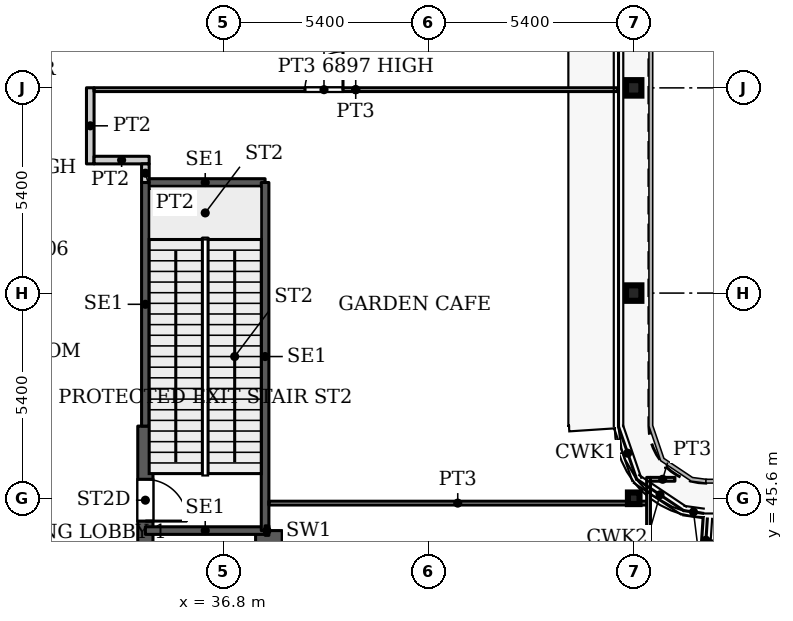
"""IFC4 building model, lengths in metres.
Left out: names, types, materials, properties, quantities, classifications, styles, units other than length and angle.
Written with IfcOpenShell. Run it as: python <this file> out.ifc"""

import sys

from ifc_helpers import new_model, si_unit, direction, frame, frame_2d, origin, origin_2d, place, context, subcontext, project, spatial, rectangle, hollow_rectangle, i_section, extrude, source, transform, mapped, element, fill, save


model = new_model("IFC4")
c1 = context("Model", 3, precision=1e-05, world=origin(), true_north=direction((0.0, 1.0)))
c2 = subcontext(c1, "Body", "Model", "MODEL_VIEW")
j1 = project(units=[si_unit("LENGTHUNIT", "METRE"), si_unit("PLANEANGLEUNIT", "RADIAN")], contexts=[c1])
p1 = place(None, origin())
s1 = spatial("IfcSite", under=j1, at=p1, CompositionType="ELEMENT")
p2 = place(p1, origin())
s2 = spatial("IfcBuilding", under=s1, at=p2, CompositionType="ELEMENT")
p3 = place(p2, frame((0.0, 0.0, 203.3)))
s3 = spatial("IfcBuildingStorey", under=s2, at=p3, CompositionType="ELEMENT", Elevation=203.3)
for number, where, z_axis, x_axis in (
    (1, (47.6, 51.0, 0.0), (0.0, 0.0, 1.0), (1.0, 0.0, 0.0)),
    (2, (47.6, 56.4, 0.0), (0.0, 0.0, 1.0), (1.0, 0.0, 0.0)),
):
    element("IfcColumn", number, at=place(p3, frame(where, z_axis=z_axis, x_axis=x_axis)), inside=s3, PredefinedType="COLUMN", context=c2, shape_type="SweptSolid", body=[
        extrude(i_section(OverallWidth=0.404, OverallDepth=0.407, WebThickness=0.027, FlangeThickness=0.044, FilletRadius=0.012, at=origin_2d()), origin(), (0.0, 0.0, 1.0), 7.8),
    ])
p4 = place(p3, frame((47.6, 45.6, 0.0), z_axis=(0.0, 0.0, 1.0), x_axis=(1.0, 0.0, 0.0)))
e3 = element("IfcColumn", 3, at=p4, inside=s3, PredefinedType="COLUMN", context=c2, shape_type="SweptSolid", body=[
    extrude(hollow_rectangle(XDim=0.305, YDim=0.305, WallThickness=0.016, InnerFilletRadius=0.016, OuterFilletRadius=0.032, at=origin_2d()), origin(), (0.0, 0.0, 1.0), 7.8),
])
p5 = place(p3, frame((34.75, 29.05, 0.0), z_axis=(0.0, 0.0, 1.0), x_axis=(0.0, 1.0, 0.0)))
e4 = element("IfcWall", 4, at=p5, inside=s3, PredefinedType="SHEAR", context=c2, shape_type="SweptSolid", body=[
    extrude(rectangle(XDim=18.45, YDim=0.4, at=frame_2d((9.225, 0.0))), origin(), (0.0, 0.0, 1.0), 7.8),
])
p6 = place(p5, frame((8.025, 0.0, 0.0)))
e5 = element("IfcOpeningElement", 5, at=p6, cuts=e4, PredefinedType="OPENING", context=c2, shape_type="SweptSolid", body=[
    extrude(rectangle(XDim=1.1, YDim=2.2, at=frame_2d((0.55, 1.1))), frame((0.0, 0.21, 0.0), z_axis=(0.0, -1.0, 0.0), x_axis=(1.0, 0.0, 0.0)), (0.0, 0.0, 1.0), 0.42),
])
p7 = place(p5, frame((10.875, 0.0, 0.0)))
e6 = element("IfcOpeningElement", 6, at=p7, cuts=e4, PredefinedType="OPENING", context=c2, shape_type="SweptSolid", body=[
    extrude(rectangle(XDim=1.1, YDim=2.2, at=frame_2d((0.55, 1.1))), frame((0.0, 0.21, 0.0), z_axis=(0.0, -1.0, 0.0), x_axis=(1.0, 0.0, 0.0)), (0.0, 0.0, 1.0), 0.42),
])
p8 = place(p5, frame((13.725, 0.0, 0.0)))
e7 = element("IfcOpeningElement", 7, at=p8, cuts=e4, PredefinedType="OPENING", context=c2, shape_type="SweptSolid", body=[
    extrude(rectangle(XDim=1.1, YDim=2.2, at=frame_2d((0.55, 1.1))), frame((0.0, 0.21, 0.0), z_axis=(0.0, -1.0, 0.0), x_axis=(1.0, 0.0, 0.0)), (0.0, 0.0, 1.0), 0.42),
])
p9 = place(p5, frame((15.95, 0.0, 0.0)))
e8 = element("IfcOpeningElement", 8, at=p9, cuts=e4, PredefinedType="OPENING", context=c2, shape_type="SweptSolid", body=[
    extrude(rectangle(XDim=1.1, YDim=2.2, at=frame_2d((0.55, 1.1))), frame((0.0, 0.21, 0.0), z_axis=(0.0, -1.0, 0.0), x_axis=(1.0, 0.0, 0.0)), (0.0, 0.0, 1.0), 0.42),
])
p10 = place(p3, frame((38.0, 36.2, 0.0), z_axis=(0.0, 0.0, 1.0), x_axis=(0.0, 1.0, 0.0)))
e9 = element("IfcWall", 9, at=p10, inside=s3, PredefinedType="SHEAR", context=c2, shape_type="SweptSolid", body=[
    extrude(rectangle(XDim=8.55, YDim=0.7, at=frame_2d((4.275, 0.0))), origin(), (0.0, 0.0, 1.0), 7.8),
])
for number, where, z_axis, x_axis in (
    (10, (34.75, 44.75, 0.0), (0.0, 0.0, 1.0), (1.0, 0.0, 0.0)),
    (11, (34.75, 53.91, 0.0), (0.0, 0.0, 1.0), (1.0, 0.0, 0.0)),
):
    element("IfcWall", number, at=place(p3, frame(where, z_axis=z_axis, x_axis=x_axis)), inside=s3, PredefinedType="SHEAR", context=c2, shape_type="SweptSolid", body=[
        extrude(rectangle(XDim=3.15, YDim=0.2, at=frame_2d((1.575, 0.0))), origin(), (0.0, 0.0, 1.0), 7.8),
    ])
p11 = place(p3, frame((34.75, 47.5, 0.0), z_axis=(0.0, 0.0, 1.0), x_axis=(0.0, 1.0, 0.0)))
e12 = element("IfcWall", 12, at=p11, inside=s3, PredefinedType="SHEAR", context=c2, shape_type="SweptSolid", body=[
    extrude(rectangle(XDim=6.41, YDim=0.2, at=frame_2d((3.205, 0.0))), origin(), (0.0, 0.0, 1.0), 7.8),
])
p12 = place(p3, frame((37.9, 44.75, 0.0), z_axis=(0.0, 0.0, 1.0), x_axis=(0.0, 1.0, 0.0)))
e13 = element("IfcWall", 13, at=p12, inside=s3, PredefinedType="SHEAR", context=c2, shape_type="SweptSolid", body=[
    extrude(rectangle(XDim=9.16, YDim=0.2, at=frame_2d((4.58, 0.0))), origin(), (0.0, 0.0, 1.0), 7.8),
])
p13 = place(p3, frame((37.9, 44.75, 0.0), z_axis=(0.0, 0.0, 1.0), x_axis=(1.0, 0.0, 0.0)))
e14 = element("IfcWall", 14, at=p13, inside=s3, PredefinedType="PARTITIONING", context=c2, shape_type="SweptSolid", body=[
    extrude(rectangle(XDim=0.1, YDim=0.25, at=frame_2d((0.05, 0.0))), origin(), (0.0, 0.0, 1.0), 7.8),
])
p14 = place(p3, frame((33.3, 54.4, 0.0), z_axis=(0.0, 0.0, 1.0), x_axis=(0.0, 1.0, 0.0)))
e15 = element("IfcWall", 15, at=p14, inside=s3, PredefinedType="PARTITIONING", context=c2, shape_type="SweptSolid", body=[
    extrude(rectangle(XDim=2.003, YDim=0.2, at=frame_2d((1.001, 0.0))), origin(), (0.0, 0.0, 1.0), 7.5),
])
p15 = place(p3, frame((33.4, 54.5, 0.0), z_axis=(0.0, 0.0, 1.0), x_axis=(1.0, 0.0, 0.0)))
e16 = element("IfcWall", 16, at=p15, inside=s3, PredefinedType="PARTITIONING", context=c2, shape_type="SweptSolid", body=[
    extrude(rectangle(XDim=1.45, YDim=0.2, at=frame_2d((0.725, 0.0))), origin(), (0.0, 0.0, 1.0), 7.5),
])
p16 = place(p3, frame((33.4, 56.353, 0.0), z_axis=(0.0, 0.0, 1.0), x_axis=(1.0, 0.0, 0.0)))
e17 = element("IfcWall", 17, at=p16, inside=s3, PredefinedType="PARTITIONING", context=c2, shape_type="SweptSolid", body=[
    extrude(rectangle(XDim=13.77, YDim=0.1, at=frame_2d((6.885, 0.0))), origin(), (0.0, 0.0, 1.0), 6.897),
])
p17 = place(p16, frame((5.55, 0.0, 0.0)))
e18 = element("IfcOpeningElement", 18, at=p17, cuts=e17, PredefinedType="OPENING", context=c2, shape_type="SweptSolid", body=[
    extrude(rectangle(XDim=1.0, YDim=2.1, at=frame_2d((0.5, 1.05))), frame((0.0, 0.06, 0.0), z_axis=(0.0, -1.0, 0.0), x_axis=(1.0, 0.0, 0.0)), (0.0, 0.0, 1.0), 0.12),
])
p18 = place(p3, frame((34.75, 53.91, 0.0), z_axis=(0.0, 0.0, 1.0), x_axis=(0.0, 1.0, 0.0)))
e19 = element("IfcWall", 19, at=p18, inside=s3, PredefinedType="PARTITIONING", context=c2, shape_type="SweptSolid", body=[
    extrude(rectangle(XDim=0.49, YDim=0.2, at=frame_2d((0.245, 0.0))), origin(), (0.0, 0.0, 1.0), 7.5),
])
p19 = place(p3, frame((37.999, 45.473, 0.0), z_axis=(0.0, 0.0, 1.0), x_axis=(1.0, 0.0, 0.0)))
e20 = element("IfcWall", 20, at=p19, inside=s3, PredefinedType="PARTITIONING", context=c2, shape_type="SweptSolid", body=[
    extrude(rectangle(XDim=9.941, YDim=0.1, at=frame_2d((4.97, 0.0))), origin(), (0.0, 0.0, 1.0), 7.5),
])
p20 = place(p3, frame((47.99, 39.449, 0.0), z_axis=(0.0, 0.0, 1.0), x_axis=(0.0, 1.0, 0.0)))
e21 = element("IfcWall", 21, at=p20, inside=s3, PredefinedType="PARTITIONING", context=c2, shape_type="SweptSolid", body=[
    extrude(rectangle(XDim=6.701, YDim=0.1, at=frame_2d((3.351, 0.0))), origin(), (0.0, 0.0, 1.0), 7.5),
])
p21 = place(p20, frame((2.374, 0.0, 0.0)))
e22 = element("IfcOpeningElement", 22, at=p21, cuts=e21, PredefinedType="OPENING", context=c2, shape_type="SweptSolid", body=[
    extrude(rectangle(XDim=1.0, YDim=2.1, at=frame_2d((0.5, 1.05))), frame((0.0, 0.06, 0.0), z_axis=(0.0, -1.0, 0.0), x_axis=(1.0, 0.0, 0.0)), (0.0, 0.0, 1.0), 0.12),
])
p22 = place(p3, frame((48.04, 46.1, 0.0), z_axis=(0.0, 0.0, 1.0), x_axis=(1.0, 0.0, 0.0)))
e23 = element("IfcWall", 23, at=p22, inside=s3, PredefinedType="PARTITIONING", context=c2, shape_type="SweptSolid", body=[
    extrude(rectangle(XDim=0.644, YDim=0.1, at=frame_2d((0.322, 0.0))), origin(), (0.0, 0.0, 1.0), 7.5),
])
m1 = source(origin(), c2, "Body", "SweptSolid", [
    extrude(rectangle(XDim=1.1, YDim=2.2, at=frame_2d((0.55, 1.1))), frame((0.0, 0.025, 0.0), z_axis=(0.0, -1.0, 0.0), x_axis=(1.0, 0.0, 0.0)), (0.0, 0.0, 1.0), 0.05),
])
p23 = place(p9, origin())
e24 = element("IfcDoor", 24, at=p23, inside=s3, OperationType="SINGLE_SWING_RIGHT", PredefinedType="DOOR", context=c2, shape_type="MappedRepresentation", body=[
    mapped(m1, transform((0.0, 0.0, 0.0), x_axis=(1.0, 0.0, 0.0), y_axis=(0.0, 1.0, 0.0), z_axis=(0.0, 0.0, 1.0), scale=1.0)),
])
fill(e8, e24)
m2 = source(origin(), c2, "Body", "SweptSolid", [
    extrude(rectangle(XDim=1.0, YDim=2.1, at=frame_2d((0.5, 1.05))), frame((0.0, 0.025, 0.0), z_axis=(0.0, -1.0, 0.0), x_axis=(1.0, 0.0, 0.0)), (0.0, 0.0, 1.0), 0.05),
])
p24 = place(p17, origin())
e25 = element("IfcDoor", 25, at=p24, inside=s3, OperationType="SINGLE_SWING_LEFT", PredefinedType="DOOR", context=c2, shape_type="MappedRepresentation", body=[
    mapped(m2, transform((0.0, 0.0, 0.0), x_axis=(1.0, 0.0, 0.0), y_axis=(0.0, 1.0, 0.0), z_axis=(0.0, 0.0, 1.0), scale=1.0)),
])
fill(e18, e25)
save(model, sys.argv[1])
